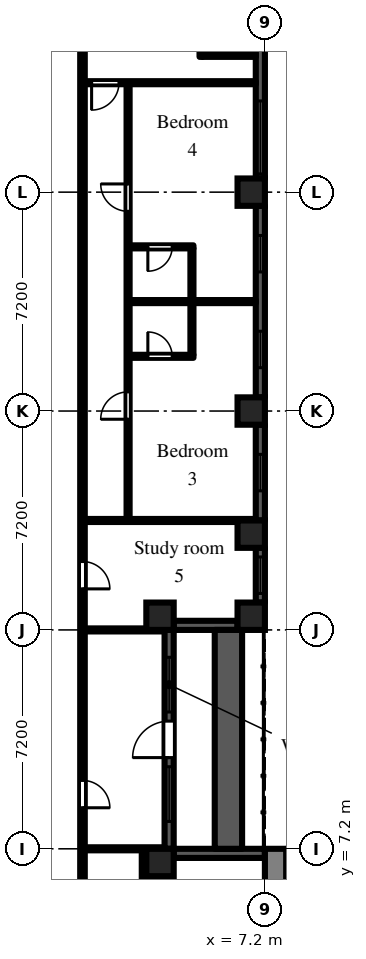
"""IFC4 building model, lengths in metres.
Left out: names, types, materials, properties, quantities, classifications, styles, units other than length and angle.
Written with IfcOpenShell. Run it as: python <this file> out.ifc"""

import sys

from ifc_helpers import new_model, si_unit, direction, frame, frame_2d, origin, origin_2d, place, context, subcontext, project, spatial, rectangle, extrude, element, fill, save


model = new_model("IFC4")
c1 = context("Model", 3, precision=1e-05, world=origin(), true_north=direction((0.0, 1.0)))
c2 = subcontext(c1, "Body", "Model", "MODEL_VIEW")
j1 = project(units=[si_unit("LENGTHUNIT", "METRE"), si_unit("PLANEANGLEUNIT", "RADIAN")], contexts=[c1])
p1 = place(None, origin())
s1 = spatial("IfcSite", under=j1, at=p1, CompositionType="ELEMENT")
p2 = place(p1, origin())
s2 = spatial("IfcBuilding", under=s1, at=p2, CompositionType="ELEMENT")
p3 = place(p2, frame((0.0, 0.0, 20.7)))
s3 = spatial("IfcBuildingStorey", under=s2, at=p3, CompositionType="ELEMENT", Elevation=20.7)
for number, where, z_axis, x_axis in (
    (1, (3.75, 6.75, 0.0), (0.0, 0.0, 1.0), (1.0, 0.0, 0.0)),
    (2, (3.75, 14.85, 0.0), (0.0, 0.0, 1.0), (1.0, 0.0, 0.0)),
    (3, (6.75, 14.85, 0.0), (0.0, 0.0, 1.0), (1.0, 0.0, 0.0)),
    (4, (6.75, 17.55, 0.0), (0.0, 0.0, 1.0), (1.0, 0.0, 0.0)),
    (5, (6.75, 21.6, 0.0), (0.0, 0.0, 1.0), (1.0, 0.0, 0.0)),
    (6, (6.75, 28.8, 0.0), (0.0, 0.0, 1.0), (1.0, 0.0, 0.0)),
):
    element("IfcColumn", number, at=place(p3, frame(where, z_axis=z_axis, x_axis=x_axis)), inside=s3, PredefinedType="COLUMN", context=c2, shape_type="SweptSolid", body=[
        extrude(rectangle(XDim=0.9, YDim=0.9, at=origin_2d()), origin(), (0.0, 0.0, 1.0), 3.0),
    ])
p4 = place(p3, frame((7.2, 7.05, 0.0), z_axis=(0.0, 0.0, 1.0), x_axis=(-1.0, 0.0, 0.0)))
e7 = element("IfcWall", 7, at=p4, inside=s3, PredefinedType="SOLIDWALL", context=c2, shape_type="SweptSolid", body=[
    extrude(rectangle(XDim=3.0, YDim=0.3, at=frame_2d((1.5, 0.0))), origin(), (0.0, 0.0, 1.0), 2.1),
])
p5 = place(p3, frame((4.05, 7.2, 0.0), z_axis=(0.0, 0.0, 1.0), x_axis=(0.0, 1.0, 0.0)))
e8 = element("IfcWall", 8, at=p5, inside=s3, PredefinedType="SOLIDWALL", context=c2, shape_type="SweptSolid", body=[
    extrude(rectangle(XDim=7.2, YDim=0.3, at=frame_2d((3.6, 0.0))), origin(), (0.0, 0.0, 1.0), 2.1),
])
p6 = place(p5, frame((3.0, 0.0, 0.0)))
e9 = element("IfcOpeningElement", 9, at=p6, cuts=e8, PredefinedType="OPENING", context=c2, shape_type="SweptSolid", body=[
    extrude(rectangle(XDim=1.2, YDim=2.05, at=frame_2d((0.6, 1.025))), frame((0.0, 0.16, 0.0), z_axis=(0.0, -1.0, 0.0), x_axis=(1.0, 0.0, 0.0)), (0.0, 0.0, 1.0), 0.32),
])
p7 = place(p5, frame((0.9, 0.0, 0.2)))
e10 = element("IfcOpeningElement", 10, at=p7, cuts=e8, PredefinedType="OPENING", context=c2, shape_type="SweptSolid", body=[
    extrude(rectangle(XDim=1.8, YDim=1.85, at=frame_2d((0.9, 0.925))), frame((0.0, 0.16, 0.0), z_axis=(0.0, -1.0, 0.0), x_axis=(1.0, 0.0, 0.0)), (0.0, 0.0, 1.0), 0.32),
])
p8 = place(p5, frame((4.5, 0.0, 0.2)))
e11 = element("IfcOpeningElement", 11, at=p8, cuts=e8, PredefinedType="OPENING", context=c2, shape_type="SweptSolid", body=[
    extrude(rectangle(XDim=1.8, YDim=1.85, at=frame_2d((0.9, 0.925))), frame((0.0, 0.16, 0.0), z_axis=(0.0, -1.0, 0.0), x_axis=(1.0, 0.0, 0.0)), (0.0, 0.0, 1.0), 0.32),
])
p9 = place(p3, frame((4.2, 14.55, 0.0), z_axis=(0.0, 0.0, 1.0), x_axis=(1.0, 0.0, 0.0)))
e12 = element("IfcWall", 12, at=p9, inside=s3, PredefinedType="SOLIDWALL", context=c2, shape_type="SweptSolid", body=[
    extrude(rectangle(XDim=2.1, YDim=0.3, at=frame_2d((1.05, 0.0))), origin(), (0.0, 0.0, 1.0), 2.1),
])
p10 = place(p3, frame((7.05, 15.3, 0.0), z_axis=(0.0, 0.0, 1.0), x_axis=(0.0, 1.0, 0.0)))
e13 = element("IfcWall", 13, at=p10, inside=s3, PredefinedType="SOLIDWALL", context=c2, shape_type="SweptSolid", body=[
    extrude(rectangle(XDim=1.8, YDim=0.3, at=frame_2d((0.9, 0.0))), origin(), (0.0, 0.0, 1.0), 2.1),
])
p11 = place(p10, frame((0.3, 0.0, 0.2)))
e14 = element("IfcOpeningElement", 14, at=p11, cuts=e13, PredefinedType="OPENING", context=c2, shape_type="SweptSolid", body=[
    extrude(rectangle(XDim=1.2, YDim=1.85, at=frame_2d((0.6, 0.925))), frame((0.0, 0.16, 0.0), z_axis=(0.0, -1.0, 0.0), x_axis=(1.0, 0.0, 0.0)), (0.0, 0.0, 1.0), 0.32),
])
p12 = place(p3, frame((7.05, 18.0, 0.0), z_axis=(0.0, 0.0, 1.0), x_axis=(0.0, 1.0, 0.0)))
e15 = element("IfcWall", 15, at=p12, inside=s3, PredefinedType="SOLIDWALL", context=c2, shape_type="SweptSolid", body=[
    extrude(rectangle(XDim=3.15, YDim=0.3, at=frame_2d((1.575, 0.0))), origin(), (0.0, 0.0, 1.0), 2.1),
])
p13 = place(p12, frame((0.975, 0.0, 0.2)))
e16 = element("IfcOpeningElement", 16, at=p13, cuts=e15, PredefinedType="OPENING", context=c2, shape_type="SweptSolid", body=[
    extrude(rectangle(XDim=1.2, YDim=1.85, at=frame_2d((0.6, 0.925))), frame((0.0, 0.16, 0.0), z_axis=(0.0, -1.0, 0.0), x_axis=(1.0, 0.0, 0.0)), (0.0, 0.0, 1.0), 0.32),
])
p14 = place(p3, frame((7.05, 22.05, 0.0), z_axis=(0.0, 0.0, 1.0), x_axis=(0.0, 1.0, 0.0)))
e17 = element("IfcWall", 17, at=p14, inside=s3, PredefinedType="SOLIDWALL", context=c2, shape_type="SweptSolid", body=[
    extrude(rectangle(XDim=6.3, YDim=0.3, at=frame_2d((3.15, 0.0))), origin(), (0.0, 0.0, 1.0), 2.1),
])
p15 = place(p14, frame((0.975, 0.0, 0.2)))
e18 = element("IfcOpeningElement", 18, at=p15, cuts=e17, PredefinedType="OPENING", context=c2, shape_type="SweptSolid", body=[
    extrude(rectangle(XDim=1.2, YDim=1.85, at=frame_2d((0.6, 0.925))), frame((0.0, 0.16, 0.0), z_axis=(0.0, -1.0, 0.0), x_axis=(1.0, 0.0, 0.0)), (0.0, 0.0, 1.0), 0.32),
])
p16 = place(p14, frame((4.125, 0.0, 0.2)))
e19 = element("IfcOpeningElement", 19, at=p16, cuts=e17, PredefinedType="OPENING", context=c2, shape_type="SweptSolid", body=[
    extrude(rectangle(XDim=1.2, YDim=1.85, at=frame_2d((0.6, 0.925))), frame((0.0, 0.16, 0.0), z_axis=(0.0, -1.0, 0.0), x_axis=(1.0, 0.0, 0.0)), (0.0, 0.0, 1.0), 0.32),
])
p17 = place(p3, frame((7.05, 29.25, 0.0), z_axis=(0.0, 0.0, 1.0), x_axis=(0.0, 1.0, 0.0)))
e20 = element("IfcWall", 20, at=p17, inside=s3, PredefinedType="SOLIDWALL", context=c2, shape_type="SweptSolid", body=[
    extrude(rectangle(XDim=6.3, YDim=0.3, at=frame_2d((3.15, 0.0))), origin(), (0.0, 0.0, 1.0), 2.1),
])
p18 = place(p17, frame((0.15, 0.0, 0.2)))
e21 = element("IfcOpeningElement", 21, at=p18, cuts=e20, PredefinedType="OPENING", context=c2, shape_type="SweptSolid", body=[
    extrude(rectangle(XDim=2.4, YDim=1.85, at=frame_2d((1.2, 0.925))), frame((0.0, 0.16, 0.0), z_axis=(0.0, -1.0, 0.0), x_axis=(1.0, 0.0, 0.0)), (0.0, 0.0, 1.0), 0.32),
])
p19 = place(p3, frame((6.0, 7.2, 0.0), z_axis=(0.0, 0.0, 1.0), x_axis=(0.0, 1.0, 0.0)))
e22 = element("IfcWall", 22, at=p19, inside=s3, PredefinedType="PARAPET", context=c2, shape_type="SweptSolid", body=[
    extrude(rectangle(XDim=7.2, YDim=0.9, at=frame_2d((3.6, 0.0))), origin(), (0.0, 0.0, 1.0), 0.8),
])
p20 = place(p3, frame((7.55, -7.2, 0.0), z_axis=(0.0, 0.0, 1.0), x_axis=(0.0, 1.0, 0.0)))
e23 = element("IfcWall", 23, at=p20, inside=s3, PredefinedType="SHEAR", context=c2, shape_type="SweptSolid", body=[
    extrude(rectangle(XDim=14.4, YDim=0.7, at=frame_2d((7.2, 0.0))), origin(), (0.0, 0.0, 1.0), 2.575),
])
p21 = place(p20, frame((6.0, 0.0, 0.0)))
e24 = element("IfcOpeningElement", 24, at=p21, cuts=e23, PredefinedType="OPENING", context=c2, shape_type="SweptSolid", body=[
    extrude(rectangle(XDim=2.4, YDim=2.2, at=frame_2d((1.2, 1.1))), frame((0.0, 0.36, 0.0), z_axis=(0.0, -1.0, 0.0), x_axis=(1.0, 0.0, 0.0)), (0.0, 0.0, 1.0), 0.72),
])
p22 = place(p3, frame((1.2, 1.125, 0.0), z_axis=(0.0, 0.0, 1.0), x_axis=(0.0, 1.0, 0.0)))
e25 = element("IfcWall", 25, at=p22, inside=s3, PredefinedType="PARTITIONING", context=c2, shape_type="SweptSolid", body=[
    extrude(rectangle(XDim=35.375, YDim=0.15, at=frame_2d((17.688, 0.0))), origin(), (0.0, 0.0, 1.0), 2.575),
])
p23 = place(p22, frame((2.625, 0.0, 0.0)))
e26 = element("IfcOpeningElement", 26, at=p23, cuts=e25, PredefinedType="OPENING", context=c2, shape_type="SweptSolid", body=[
    extrude(rectangle(XDim=0.9, YDim=2.1, at=frame_2d((0.45, 1.05))), frame((0.0, 0.085, 0.0), z_axis=(0.0, -1.0, 0.0), x_axis=(1.0, 0.0, 0.0)), (0.0, 0.0, 1.0), 0.17),
])
p24 = place(p22, frame((7.425, 0.0, 0.0)))
e27 = element("IfcOpeningElement", 27, at=p24, cuts=e25, PredefinedType="OPENING", context=c2, shape_type="SweptSolid", body=[
    extrude(rectangle(XDim=0.9, YDim=2.1, at=frame_2d((0.45, 1.05))), frame((0.0, 0.085, 0.0), z_axis=(0.0, -1.0, 0.0), x_axis=(1.0, 0.0, 0.0)), (0.0, 0.0, 1.0), 0.17),
])
p25 = place(p22, frame((14.625, 0.0, 0.0)))
e28 = element("IfcOpeningElement", 28, at=p25, cuts=e25, PredefinedType="OPENING", context=c2, shape_type="SweptSolid", body=[
    extrude(rectangle(XDim=0.9, YDim=2.1, at=frame_2d((0.45, 1.05))), frame((0.0, 0.085, 0.0), z_axis=(0.0, -1.0, 0.0), x_axis=(1.0, 0.0, 0.0)), (0.0, 0.0, 1.0), 0.17),
])
p26 = place(p22, frame((32.825, 0.0, 0.0)))
e29 = element("IfcOpeningElement", 29, at=p26, cuts=e25, PredefinedType="OPENING", context=c2, shape_type="SweptSolid", body=[
    extrude(rectangle(XDim=1.0, YDim=2.1, at=frame_2d((0.5, 1.05))), frame((0.0, 0.085, 0.0), z_axis=(0.0, -1.0, 0.0), x_axis=(1.0, 0.0, 0.0)), (0.0, 0.0, 1.0), 0.17),
])
for number, where, z_axis, x_axis in (
    (30, (1.275, 7.2, 0.0), (0.0, 0.0, 1.0), (1.0, 0.0, 0.0)),
    (31, (1.275, 14.4, 0.0), (0.0, 0.0, 1.0), (1.0, 0.0, 0.0)),
):
    element("IfcWall", number, at=place(p3, frame(where, z_axis=z_axis, x_axis=x_axis)), inside=s3, PredefinedType="PARTITIONING", context=c2, shape_type="SweptSolid", body=[
        extrude(rectangle(XDim=2.625, YDim=0.1, at=frame_2d((1.312, 0.0))), origin(), (0.0, 0.0, 1.0), 2.575),
    ])
p27 = place(p3, frame((1.275, 18.0, 0.0), z_axis=(0.0, 0.0, 1.0), x_axis=(1.0, 0.0, 0.0)))
e32 = element("IfcWall", 32, at=p27, inside=s3, PredefinedType="PARTITIONING", context=c2, shape_type="SweptSolid", body=[
    extrude(rectangle(XDim=5.625, YDim=0.1, at=frame_2d((2.812, 0.0))), origin(), (0.0, 0.0, 1.0), 2.575),
])
p28 = place(p3, frame((1.275, 32.4, 0.0), z_axis=(0.0, 0.0, 1.0), x_axis=(1.0, 0.0, 0.0)))
e33 = element("IfcWall", 33, at=p28, inside=s3, PredefinedType="PARTITIONING", context=c2, shape_type="SweptSolid", body=[
    extrude(rectangle(XDim=5.625, YDim=0.1, at=frame_2d((2.812, 0.0))), origin(), (0.0, 0.0, 1.0), 2.575),
])
p29 = place(p28, frame((0.225, 0.0, 0.0)))
e34 = element("IfcOpeningElement", 34, at=p29, cuts=e33, PredefinedType="OPENING", context=c2, shape_type="SweptSolid", body=[
    extrude(rectangle(XDim=0.9, YDim=2.1, at=frame_2d((0.45, 1.05))), frame((0.0, 0.06, 0.0), z_axis=(0.0, -1.0, 0.0), x_axis=(1.0, 0.0, 0.0)), (0.0, 0.0, 1.0), 0.12),
])
p30 = place(p3, frame((2.7, 18.05, 0.0), z_axis=(0.0, 0.0, 1.0), x_axis=(0.0, 1.0, 0.0)))
e35 = element("IfcWall", 35, at=p30, inside=s3, PredefinedType="PARTITIONING", context=c2, shape_type="SweptSolid", body=[
    extrude(rectangle(XDim=14.3, YDim=0.1, at=frame_2d((7.15, 0.0))), origin(), (0.0, 0.0, 1.0), 2.575),
])
p31 = place(p30, frame((3.28, 0.0, 0.0)))
e36 = element("IfcOpeningElement", 36, at=p31, cuts=e35, PredefinedType="OPENING", context=c2, shape_type="SweptSolid", body=[
    extrude(rectangle(XDim=0.9, YDim=2.1, at=frame_2d((0.45, 1.05))), frame((0.0, 0.06, 0.0), z_axis=(0.0, -1.0, 0.0), x_axis=(1.0, 0.0, 0.0)), (0.0, 0.0, 1.0), 0.12),
])
p32 = place(p30, frame((10.12, 0.0, 0.0)))
e37 = element("IfcOpeningElement", 37, at=p32, cuts=e35, PredefinedType="OPENING", context=c2, shape_type="SweptSolid", body=[
    extrude(rectangle(XDim=0.9, YDim=2.1, at=frame_2d((0.45, 1.05))), frame((0.0, 0.06, 0.0), z_axis=(0.0, -1.0, 0.0), x_axis=(1.0, 0.0, 0.0)), (0.0, 0.0, 1.0), 0.12),
])
p33 = place(p3, frame((2.75, 23.4, 0.0), z_axis=(0.0, 0.0, 1.0), x_axis=(1.0, 0.0, 0.0)))
e38 = element("IfcWall", 38, at=p33, inside=s3, PredefinedType="PARTITIONING", context=c2, shape_type="SweptSolid", body=[
    extrude(rectangle(XDim=2.1, YDim=0.1, at=frame_2d((1.05, 0.0))), origin(), (0.0, 0.0, 1.0), 2.575),
])
p34 = place(p33, frame((0.6, 0.0, 0.0)))
e39 = element("IfcOpeningElement", 39, at=p34, cuts=e38, PredefinedType="OPENING", context=c2, shape_type="SweptSolid", body=[
    extrude(rectangle(XDim=0.8, YDim=2.1, at=frame_2d((0.4, 1.05))), frame((0.0, 0.06, 0.0), z_axis=(0.0, -1.0, 0.0), x_axis=(1.0, 0.0, 0.0)), (0.0, 0.0, 1.0), 0.12),
])
p35 = place(p3, frame((2.75, 25.2, 0.0), z_axis=(0.0, 0.0, 1.0), x_axis=(1.0, 0.0, 0.0)))
e40 = element("IfcWall", 40, at=p35, inside=s3, PredefinedType="PARTITIONING", context=c2, shape_type="SweptSolid", body=[
    extrude(rectangle(XDim=4.15, YDim=0.1, at=frame_2d((2.075, 0.0))), origin(), (0.0, 0.0, 1.0), 2.575),
])
p36 = place(p3, frame((2.75, 27.0, 0.0), z_axis=(0.0, 0.0, 1.0), x_axis=(1.0, 0.0, 0.0)))
e41 = element("IfcWall", 41, at=p36, inside=s3, PredefinedType="PARTITIONING", context=c2, shape_type="SweptSolid", body=[
    extrude(rectangle(XDim=2.1, YDim=0.1, at=frame_2d((1.05, 0.0))), origin(), (0.0, 0.0, 1.0), 2.575),
])
p37 = place(p36, frame((0.6, 0.0, 0.0)))
e42 = element("IfcOpeningElement", 42, at=p37, cuts=e41, PredefinedType="OPENING", context=c2, shape_type="SweptSolid", body=[
    extrude(rectangle(XDim=0.8, YDim=2.1, at=frame_2d((0.4, 1.05))), frame((0.0, 0.06, 0.0), z_axis=(0.0, -1.0, 0.0), x_axis=(1.0, 0.0, 0.0)), (0.0, 0.0, 1.0), 0.12),
])
p38 = place(p3, frame((3.2, 1.275, 0.0), z_axis=(0.0, 0.0, 1.0), x_axis=(0.0, 1.0, 0.0)))
e43 = element("IfcWall", 43, at=p38, inside=s3, PredefinedType="PARTITIONING", context=c2, shape_type="SweptSolid", body=[
    extrude(rectangle(XDim=5.875, YDim=0.1, at=frame_2d((2.938, 0.0))), origin(), (0.0, 0.0, 1.0), 2.575),
])
p39 = place(p3, frame((4.8, 23.45, 0.0), z_axis=(0.0, 0.0, 1.0), x_axis=(0.0, 1.0, 0.0)))
e44 = element("IfcWall", 44, at=p39, inside=s3, PredefinedType="PARTITIONING", context=c2, shape_type="SweptSolid", body=[
    extrude(rectangle(XDim=3.5, YDim=0.1, at=frame_2d((1.75, 0.0))), origin(), (0.0, 0.0, 1.0), 2.575),
])
p40 = place(p3, frame((5.1, 33.25, 0.0), z_axis=(0.0, 0.0, 1.0), x_axis=(0.0, 1.0, 0.0)))
e45 = element("IfcWall", 45, at=p40, inside=s3, PredefinedType="PARTITIONING", context=c2, shape_type="SweptSolid", body=[
    extrude(rectangle(XDim=1.9, YDim=0.1, at=frame_2d((0.95, 0.0))), origin(), (0.0, 0.0, 1.0), 2.575),
])
p41 = place(p40, frame((0.55, 0.0, 0.0)))
e46 = element("IfcOpeningElement", 46, at=p41, cuts=e45, PredefinedType="OPENING", context=c2, shape_type="SweptSolid", body=[
    extrude(rectangle(XDim=0.8, YDim=2.1, at=frame_2d((0.4, 1.05))), frame((0.0, 0.06, 0.0), z_axis=(0.0, -1.0, 0.0), x_axis=(1.0, 0.0, 0.0)), (0.0, 0.0, 1.0), 0.12),
])
p42 = place(p3, frame((5.15, 33.3, 0.0), z_axis=(0.0, 0.0, 1.0), x_axis=(1.0, 0.0, 0.0)))
e47 = element("IfcWall", 47, at=p42, inside=s3, PredefinedType="PARTITIONING", context=c2, shape_type="SweptSolid", body=[
    extrude(rectangle(XDim=1.75, YDim=0.1, at=frame_2d((0.875, 0.0))), origin(), (0.0, 0.0, 1.0), 2.575),
])
p43 = place(p6, origin())
e48 = element("IfcDoor", 48, at=p43, inside=s3, OperationType="SINGLE_SWING_LEFT", PredefinedType="DOOR", context=c2, shape_type="SweptSolid", body=[
    extrude(rectangle(XDim=1.2, YDim=2.05, at=frame_2d((0.6, 1.025))), frame((0.0, 0.025, 0.0), z_axis=(0.0, -1.0, 0.0), x_axis=(1.0, 0.0, 0.0)), (0.0, 0.0, 1.0), 0.05),
])
fill(e9, e48)
p44 = place(p7, origin())
e49 = element("IfcWindow", 49, at=p44, inside=s3, PartitioningType="SINGLE_PANEL", PredefinedType="WINDOW", context=c2, shape_type="SweptSolid", body=[
    extrude(rectangle(XDim=1.8, YDim=1.85, at=frame_2d((0.9, 0.925))), frame((0.0, 0.03, 0.0), z_axis=(0.0, -1.0, 0.0), x_axis=(1.0, 0.0, 0.0)), (0.0, 0.0, 1.0), 0.06),
])
fill(e10, e49)
p45 = place(p8, origin())
e50 = element("IfcWindow", 50, at=p45, inside=s3, PartitioningType="SINGLE_PANEL", PredefinedType="WINDOW", context=c2, shape_type="SweptSolid", body=[
    extrude(rectangle(XDim=1.8, YDim=1.85, at=frame_2d((0.9, 0.925))), frame((0.0, 0.03, 0.0), z_axis=(0.0, -1.0, 0.0), x_axis=(1.0, 0.0, 0.0)), (0.0, 0.0, 1.0), 0.06),
])
fill(e11, e50)
p46 = place(p11, origin())
e51 = element("IfcWindow", 51, at=p46, inside=s3, PartitioningType="SINGLE_PANEL", PredefinedType="WINDOW", context=c2, shape_type="SweptSolid", body=[
    extrude(rectangle(XDim=1.2, YDim=1.85, at=frame_2d((0.6, 0.925))), frame((0.0, 0.03, 0.0), z_axis=(0.0, -1.0, 0.0), x_axis=(1.0, 0.0, 0.0)), (0.0, 0.0, 1.0), 0.06),
])
fill(e14, e51)
p47 = place(p13, origin())
e52 = element("IfcWindow", 52, at=p47, inside=s3, PartitioningType="SINGLE_PANEL", PredefinedType="WINDOW", context=c2, shape_type="SweptSolid", body=[
    extrude(rectangle(XDim=1.2, YDim=1.85, at=frame_2d((0.6, 0.925))), frame((0.0, 0.03, 0.0), z_axis=(0.0, -1.0, 0.0), x_axis=(1.0, 0.0, 0.0)), (0.0, 0.0, 1.0), 0.06),
])
fill(e16, e52)
p48 = place(p15, origin())
e53 = element("IfcWindow", 53, at=p48, inside=s3, PartitioningType="SINGLE_PANEL", PredefinedType="WINDOW", context=c2, shape_type="SweptSolid", body=[
    extrude(rectangle(XDim=1.2, YDim=1.85, at=frame_2d((0.6, 0.925))), frame((0.0, 0.03, 0.0), z_axis=(0.0, -1.0, 0.0), x_axis=(1.0, 0.0, 0.0)), (0.0, 0.0, 1.0), 0.06),
])
fill(e18, e53)
p49 = place(p16, origin())
e54 = element("IfcWindow", 54, at=p49, inside=s3, PartitioningType="SINGLE_PANEL", PredefinedType="WINDOW", context=c2, shape_type="SweptSolid", body=[
    extrude(rectangle(XDim=1.2, YDim=1.85, at=frame_2d((0.6, 0.925))), frame((0.0, 0.03, 0.0), z_axis=(0.0, -1.0, 0.0), x_axis=(1.0, 0.0, 0.0)), (0.0, 0.0, 1.0), 0.06),
])
fill(e19, e54)
p50 = place(p18, origin())
e55 = element("IfcWindow", 55, at=p50, inside=s3, PartitioningType="SINGLE_PANEL", PredefinedType="WINDOW", context=c2, shape_type="SweptSolid", body=[
    extrude(rectangle(XDim=2.4, YDim=1.85, at=frame_2d((1.2, 0.925))), frame((0.0, 0.03, 0.0), z_axis=(0.0, -1.0, 0.0), x_axis=(1.0, 0.0, 0.0)), (0.0, 0.0, 1.0), 0.06),
])
fill(e21, e55)
p51 = place(p24, frame((0.9, 0.0, 0.0), z_axis=(0.0, 0.0, 1.0), x_axis=(-1.0, 0.0, 0.0)))
e56 = element("IfcDoor", 56, at=p51, inside=s3, OperationType="SINGLE_SWING_RIGHT", PredefinedType="DOOR", context=c2, shape_type="SweptSolid", body=[
    extrude(rectangle(XDim=0.9, YDim=2.1, at=frame_2d((0.45, 1.05))), frame((0.0, 0.025, 0.0), z_axis=(0.0, -1.0, 0.0), x_axis=(1.0, 0.0, 0.0)), (0.0, 0.0, 1.0), 0.05),
])
fill(e27, e56)
p52 = place(p25, frame((0.9, 0.0, 0.0), z_axis=(0.0, 0.0, 1.0), x_axis=(-1.0, 0.0, 0.0)))
e57 = element("IfcDoor", 57, at=p52, inside=s3, OperationType="SINGLE_SWING_RIGHT", PredefinedType="DOOR", context=c2, shape_type="SweptSolid", body=[
    extrude(rectangle(XDim=0.9, YDim=2.1, at=frame_2d((0.45, 1.05))), frame((0.0, 0.025, 0.0), z_axis=(0.0, -1.0, 0.0), x_axis=(1.0, 0.0, 0.0)), (0.0, 0.0, 1.0), 0.05),
])
fill(e28, e57)
p53 = place(p29, frame((0.9, 0.0, 0.0), z_axis=(0.0, 0.0, 1.0), x_axis=(-1.0, 0.0, 0.0)))
e58 = element("IfcDoor", 58, at=p53, inside=s3, OperationType="SINGLE_SWING_RIGHT", PredefinedType="DOOR", context=c2, shape_type="SweptSolid", body=[
    extrude(rectangle(XDim=0.9, YDim=2.1, at=frame_2d((0.45, 1.05))), frame((0.0, 0.025, 0.0), z_axis=(0.0, -1.0, 0.0), x_axis=(1.0, 0.0, 0.0)), (0.0, 0.0, 1.0), 0.05),
])
fill(e34, e58)
p54 = place(p31, origin())
e59 = element("IfcDoor", 59, at=p54, inside=s3, OperationType="SINGLE_SWING_LEFT", PredefinedType="DOOR", context=c2, shape_type="SweptSolid", body=[
    extrude(rectangle(XDim=0.9, YDim=2.1, at=frame_2d((0.45, 1.05))), frame((0.0, 0.025, 0.0), z_axis=(0.0, -1.0, 0.0), x_axis=(1.0, 0.0, 0.0)), (0.0, 0.0, 1.0), 0.05),
])
fill(e36, e59)
p55 = place(p32, origin())
e60 = element("IfcDoor", 60, at=p55, inside=s3, OperationType="SINGLE_SWING_RIGHT", PredefinedType="DOOR", context=c2, shape_type="SweptSolid", body=[
    extrude(rectangle(XDim=0.9, YDim=2.1, at=frame_2d((0.45, 1.05))), frame((0.0, 0.025, 0.0), z_axis=(0.0, -1.0, 0.0), x_axis=(1.0, 0.0, 0.0)), (0.0, 0.0, 1.0), 0.05),
])
fill(e37, e60)
p56 = place(p34, origin())
e61 = element("IfcDoor", 61, at=p56, inside=s3, OperationType="SINGLE_SWING_LEFT", PredefinedType="DOOR", context=c2, shape_type="SweptSolid", body=[
    extrude(rectangle(XDim=0.8, YDim=2.1, at=frame_2d((0.4, 1.05))), frame((0.0, 0.025, 0.0), z_axis=(0.0, -1.0, 0.0), x_axis=(1.0, 0.0, 0.0)), (0.0, 0.0, 1.0), 0.05),
])
fill(e39, e61)
p57 = place(p37, frame((0.8, 0.0, 0.0), z_axis=(0.0, 0.0, 1.0), x_axis=(-1.0, 0.0, 0.0)))
e62 = element("IfcDoor", 62, at=p57, inside=s3, OperationType="SINGLE_SWING_RIGHT", PredefinedType="DOOR", context=c2, shape_type="SweptSolid", body=[
    extrude(rectangle(XDim=0.8, YDim=2.1, at=frame_2d((0.4, 1.05))), frame((0.0, 0.025, 0.0), z_axis=(0.0, -1.0, 0.0), x_axis=(1.0, 0.0, 0.0)), (0.0, 0.0, 1.0), 0.05),
])
fill(e42, e62)
save(model, sys.argv[1])
